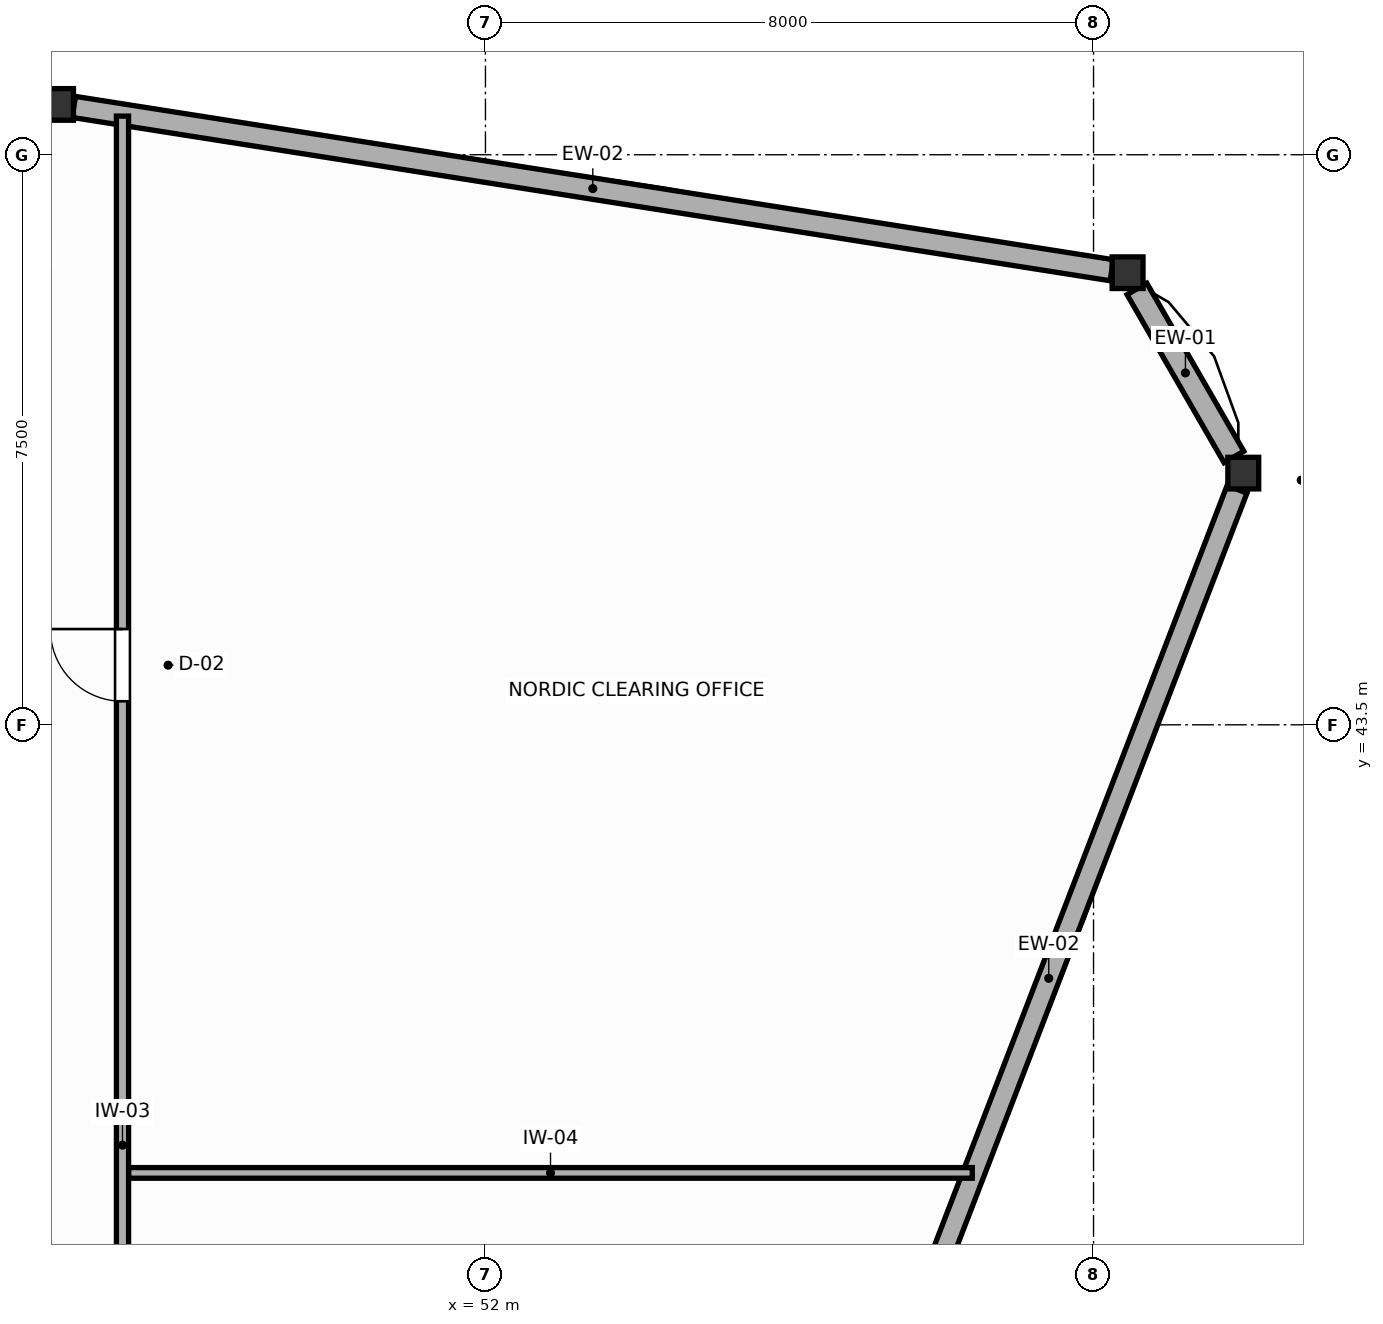
"""IFC4 building model, lengths in metres.
Left out: names, types, materials, properties, quantities, classifications, styles, units other than length and angle.
Written with IfcOpenShell. Run it as: python <this file> out.ifc"""

import sys

from ifc_helpers import new_model, si_unit, direction, frame, frame_2d, origin, origin_2d, place, context, subcontext, project, spatial, rectangle, i_section, extrude, source, transform, mapped, element, fill, save


model = new_model("IFC4")
c1 = context("Model", 3, precision=1e-05, world=origin(), true_north=direction((0.0, 1.0)))
c2 = subcontext(c1, "Body", "Model", "MODEL_VIEW")
j1 = project(units=[si_unit("LENGTHUNIT", "METRE"), si_unit("PLANEANGLEUNIT", "RADIAN")], contexts=[c1])
p1 = place(None, origin())
s1 = spatial("IfcSite", under=j1, at=p1, CompositionType="ELEMENT")
p2 = place(p1, origin())
s2 = spatial("IfcBuilding", under=s1, at=p2, CompositionType="ELEMENT")
p3 = place(p2, frame((0.0, 0.0, 213.0)))
s3 = spatial("IfcBuildingStorey", under=s2, at=p3, CompositionType="ELEMENT", Elevation=213.0)
m1 = source(origin(), c2, "Body", "SweptSolid", [
    extrude(i_section(OverallWidth=0.406, OverallDepth=0.416, WebThickness=0.027, FlangeThickness=0.044, FilletRadius=0.015, at=origin_2d()), origin(), (0.0, 0.0, 1.0), 3.6),
])
for number, where, z_axis, x_axis in (
    (1, (61.97, 46.811, 0.0), (0.0, 0.0, 1.0), (1.0, 0.0, 0.0)),
    (2, (60.448, 49.448, 0.0), (0.0, 0.0, 1.0), (1.0, 0.0, 0.0)),
    (3, (46.377, 51.662, 0.0), (0.0, 0.0, 1.0), (1.0, 0.0, 0.0)),
):
    element("IfcColumn", number, at=place(p3, frame(where, z_axis=z_axis, x_axis=x_axis)), inside=s3, PredefinedType="COLUMN", context=c2, shape_type="MappedRepresentation", body=[
        mapped(m1, transform((0.0, 0.0, 0.0), scale=1.0)),
    ])
p4 = place(p3, frame((61.847, 47.024, 0.0), z_axis=(0.0, 0.0, 1.0), x_axis=(-0.49997637333, 0.866039044219, 0.0)))
e4 = element("IfcWall", 4, at=p4, inside=s3, PredefinedType="SOLIDWALL", context=c2, shape_type="SweptSolid", body=[
    extrude(rectangle(XDim=2.552, YDim=0.3, at=frame_2d((1.276, 0.0))), origin(), (0.0, 0.0, 1.0), 1.88),
])
p5 = place(p3, frame((60.24, 49.48, 0.0), z_axis=(0.0, 0.0, 1.0), x_axis=(-0.987848165878, 0.155422009936, 0.0)))
e5 = element("IfcWall", 5, at=p5, inside=s3, PredefinedType="SOLIDWALL", context=c2, shape_type="SweptSolid", body=[
    extrude(rectangle(XDim=13.823, YDim=0.28, at=frame_2d((6.912, 0.0))), origin(), (0.0, 0.0, 1.0), 1.88),
])
p6 = place(p3, frame((56.934, 33.731, 0.0), z_axis=(0.0, 0.0, 1.0), x_axis=(0.359321962573, 0.933213655715, 0.0)))
e6 = element("IfcWall", 6, at=p6, inside=s3, PredefinedType="SOLIDWALL", context=c2, shape_type="SweptSolid", body=[
    extrude(rectangle(XDim=13.788, YDim=0.28, at=frame_2d((6.894, 0.0))), origin(), (0.0, 0.0, 1.0), 1.88),
])
p7 = place(p3, frame((47.225, 32.31, 0.0), z_axis=(0.0, 0.0, 1.0), x_axis=(0.0, 1.0, 0.0)))
e7 = element("IfcWall", 7, at=p7, inside=s3, PredefinedType="PARTITIONING", context=c2, shape_type="SweptSolid", body=[
    extrude(rectangle(XDim=19.198, YDim=0.16, at=frame_2d((9.599, 0.0))), origin(), (0.0, 0.0, 1.0), 3.41),
])
p8 = place(p7, frame((11.5, 0.0, 0.0)))
e8 = element("IfcOpeningElement", 8, at=p8, cuts=e7, PredefinedType="OPENING", context=c2, shape_type="SweptSolid", body=[
    extrude(rectangle(XDim=0.95, YDim=2.05, at=frame_2d((0.475, 1.025))), frame((0.0, 0.09, 0.0), z_axis=(0.0, -1.0, 0.0), x_axis=(1.0, 0.0, 0.0)), (0.0, 0.0, 1.0), 0.18),
])
p9 = place(p3, frame((47.307, 37.605, 0.0), z_axis=(0.0, 0.0, 1.0), x_axis=(1.0, 0.0, 0.0)))
e9 = element("IfcWall", 9, at=p9, inside=s3, PredefinedType="PARTITIONING", context=c2, shape_type="SweptSolid", body=[
    extrude(rectangle(XDim=11.098, YDim=0.14, at=frame_2d((5.549, 0.0))), origin(), (0.0, 0.0, 1.0), 3.41),
])
p10 = place(p8, origin())
e10 = element("IfcDoor", 10, at=p10, inside=s3, OperationType="SINGLE_SWING_RIGHT", PredefinedType="DOOR", context=c2, shape_type="SweptSolid", body=[
    extrude(rectangle(XDim=0.95, YDim=2.05, at=frame_2d((0.475, 1.025))), frame((0.0, 0.025, 0.0), z_axis=(0.0, -1.0, 0.0), x_axis=(1.0, 0.0, 0.0)), (0.0, 0.0, 1.0), 0.05),
])
fill(e8, e10)
save(model, sys.argv[1])
